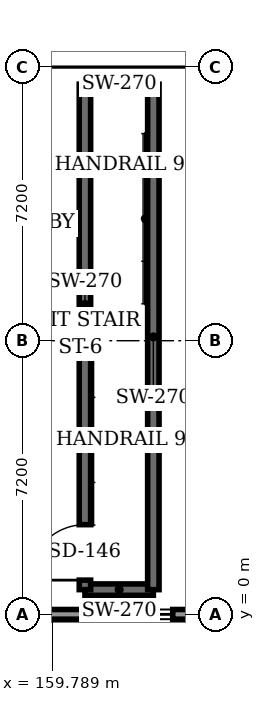
"""IFC4 building model, lengths in metres.
Left out: names, types, materials, properties, quantities, classifications, styles, units other than length and angle.
Written with IfcOpenShell. Run it as: python <this file> out.ifc"""

import sys

from ifc_helpers import new_model, si_unit, direction, frame, frame_2d, origin, place, context, subcontext, project, spatial, rectangle, extrude, element, fill, save


model = new_model("IFC4")
c1 = context("Model", 3, precision=1e-05, world=origin(), true_north=direction((0.0, 1.0)))
c2 = subcontext(c1, "Body", "Model", "MODEL_VIEW")
j1 = project(units=[si_unit("LENGTHUNIT", "METRE"), si_unit("PLANEANGLEUNIT", "RADIAN")], contexts=[c1])
p1 = place(None, origin())
s1 = spatial("IfcSite", under=j1, at=p1, CompositionType="ELEMENT")
p2 = place(p1, origin())
s2 = spatial("IfcBuilding", under=s1, at=p2, CompositionType="ELEMENT")
p3 = place(p2, origin())
s3 = spatial("IfcBuildingStorey", under=s2, at=p3, CompositionType="ELEMENT", Elevation=0.0)
p4 = place(p3, frame((165.6, 0.0, 0.0), z_axis=(0.0, 0.0, 1.0), x_axis=(-1.0, 0.0, 0.0)))
e1 = element("IfcWall", 1, at=p4, inside=s3, PredefinedType="STANDARD", context=c2, shape_type="SweptSolid", body=[
    extrude(rectangle(XDim=21.6, YDim=0.255, at=frame_2d((10.8, 0.0))), origin(), (0.0, 0.0, 1.0), 5.022),
])
p5 = place(p4, frame((2.64, 0.0, 1.15)))
e2 = element("IfcOpeningElement", 2, at=p5, cuts=e1, PredefinedType="OPENING", context=c2, shape_type="SweptSolid", body=[
    extrude(rectangle(XDim=1.66, YDim=1.54, at=frame_2d((0.83, 0.77))), frame((0.0, 0.137, 0.0), z_axis=(0.0, -1.0, 0.0), x_axis=(1.0, 0.0, 0.0)), (0.0, 0.0, 1.0), 0.275),
])
p6 = place(p4, frame((17.2, 0.0, 1.15)))
e3 = element("IfcOpeningElement", 3, at=p6, cuts=e1, PredefinedType="OPENING", context=c2, shape_type="SweptSolid", body=[
    extrude(rectangle(XDim=1.66, YDim=1.54, at=frame_2d((0.83, 0.77))), frame((0.0, 0.137, 0.0), z_axis=(0.0, -1.0, 0.0), x_axis=(1.0, 0.0, 0.0)), (0.0, 0.0, 1.0), 0.275),
])
for number, where, z_axis, x_axis in (
    (4, (160.65, 0.65, 0.0), (0.0, 0.0, 1.0), (1.0, 0.0, 0.0)),
    (5, (162.45, 13.95, 0.0), (0.0, 0.0, 1.0), (-1.0, 0.0, 0.0)),
):
    element("IfcWall", number, at=place(p3, frame(where, z_axis=z_axis, x_axis=x_axis)), inside=s3, PredefinedType="SHEAR", context=c2, shape_type="SweptSolid", body=[
        extrude(rectangle(XDim=1.8, YDim=0.3, at=frame_2d((0.9, 0.0))), origin(), (0.0, 0.0, 1.0), 5.715),
    ])
p7 = place(p3, frame((160.65, 0.65, 0.0), z_axis=(0.0, 0.0, 1.0), x_axis=(0.0, 1.0, 0.0)))
e6 = element("IfcWall", 6, at=p7, inside=s3, PredefinedType="SHEAR", context=c2, shape_type="SweptSolid", body=[
    extrude(rectangle(XDim=13.3, YDim=0.3, at=frame_2d((6.65, 0.0))), origin(), (0.0, 0.0, 1.0), 5.715),
])
p8 = place(p7, frame((0.25, 0.0, 0.0)))
e7 = element("IfcOpeningElement", 7, at=p8, cuts=e6, PredefinedType="OPENING", context=c2, shape_type="SweptSolid", body=[
    extrude(rectangle(XDim=1.46, YDim=2.24, at=frame_2d((0.73, 1.12))), frame((0.0, 0.16, 0.0), z_axis=(0.0, -1.0, 0.0), x_axis=(1.0, 0.0, 0.0)), (0.0, 0.0, 1.0), 0.32),
])
p9 = place(p3, frame((162.45, 13.95, 0.0), z_axis=(0.0, 0.0, 1.0), x_axis=(0.0, -1.0, 0.0)))
e8 = element("IfcWall", 8, at=p9, inside=s3, PredefinedType="SHEAR", context=c2, shape_type="SweptSolid", body=[
    extrude(rectangle(XDim=13.3, YDim=0.3, at=frame_2d((6.65, 0.0))), origin(), (0.0, 0.0, 1.0), 5.715),
])
p10 = place(p5, origin())
e9 = element("IfcWindow", 9, at=p10, inside=s3, PartitioningType="SINGLE_PANEL", PredefinedType="WINDOW", context=c2, shape_type="SweptSolid", body=[
    extrude(rectangle(XDim=1.66, YDim=1.54, at=frame_2d((0.83, 0.77))), frame((0.0, 0.03, 0.0), z_axis=(0.0, -1.0, 0.0), x_axis=(1.0, 0.0, 0.0)), (0.0, 0.0, 1.0), 0.06),
])
fill(e2, e9)
p11 = place(p8, origin())
e10 = element("IfcDoor", 10, at=p11, inside=s3, OperationType="SINGLE_SWING_LEFT", PredefinedType="DOOR", context=c2, shape_type="SweptSolid", body=[
    extrude(rectangle(XDim=1.46, YDim=2.24, at=frame_2d((0.73, 1.12))), frame((0.0, 0.025, 0.0), z_axis=(0.0, -1.0, 0.0), x_axis=(1.0, 0.0, 0.0)), (0.0, 0.0, 1.0), 0.05),
])
fill(e7, e10)
save(model, sys.argv[1])
